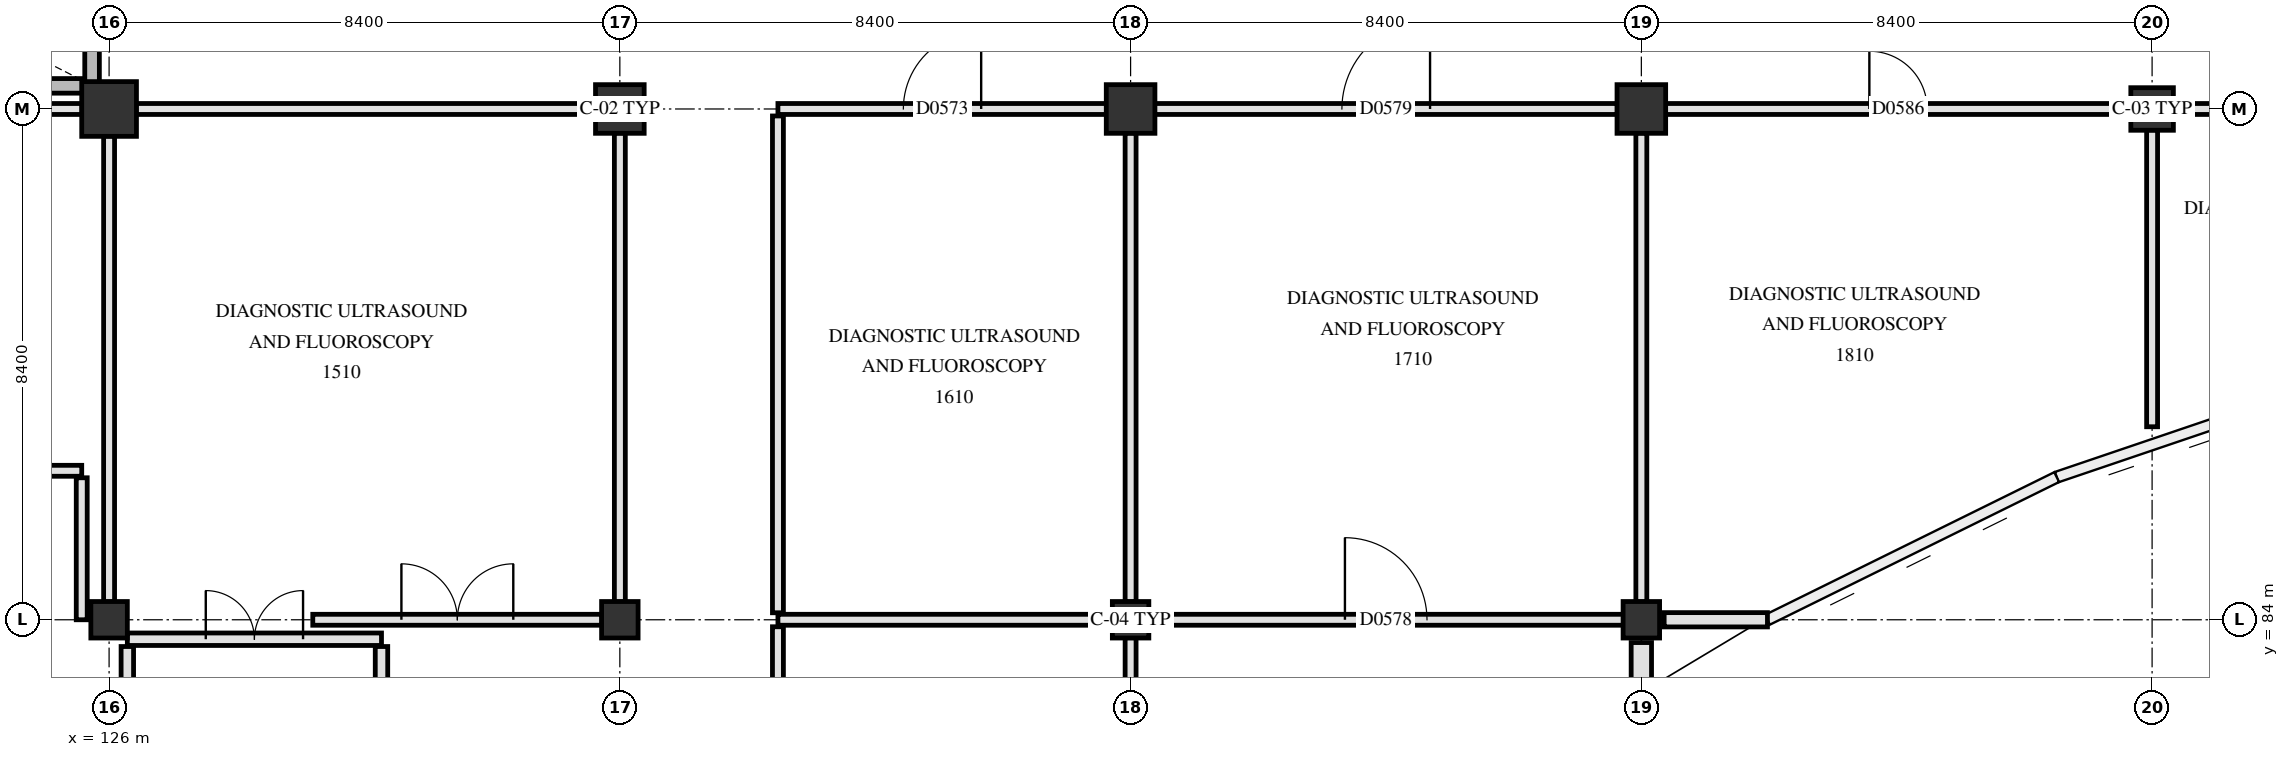
"""IFC4 building model, lengths in metres.
Left out: names, types, materials, properties, quantities, classifications, styles, units other than length and angle.
Written with IfcOpenShell. Run it as: python <this file> out.ifc"""

import sys

from ifc_helpers import new_model, si_unit, direction, frame, frame_2d, origin, origin_2d, place, context, subcontext, project, spatial, rectangle, extrude, element, fill, save


model = new_model("IFC4")
c1 = context("Model", 3, precision=1e-05, world=origin(), true_north=direction((0.0, 1.0)))
c2 = subcontext(c1, "Body", "Model", "MODEL_VIEW")
j1 = project(units=[si_unit("LENGTHUNIT", "METRE"), si_unit("PLANEANGLEUNIT", "RADIAN")], contexts=[c1])
p1 = place(None, origin())
s1 = spatial("IfcSite", under=j1, at=p1, CompositionType="ELEMENT")
p2 = place(p1, origin())
s2 = spatial("IfcBuilding", under=s1, at=p2, CompositionType="ELEMENT")
p3 = place(p2, origin())
s3 = spatial("IfcBuildingStorey", under=s2, at=p3, CompositionType="ELEMENT", Elevation=0.0)
p4 = place(p3, frame((126.0, 84.0, 0.0), z_axis=(0.0, 0.0, 1.0), x_axis=(1.0, 0.0, 0.0)))
e1 = element("IfcColumn", 1, at=p4, inside=s3, PredefinedType="COLUMN", context=c2, shape_type="SweptSolid", body=[
    extrude(rectangle(XDim=0.6, YDim=0.6, at=origin_2d()), origin(), (0.0, 0.0, 1.0), 4.8),
])
p5 = place(p3, frame((126.0, 92.4, 0.0), z_axis=(0.0, 0.0, 1.0), x_axis=(1.0, 0.0, 0.0)))
e2 = element("IfcColumn", 2, at=p5, inside=s3, PredefinedType="COLUMN", context=c2, shape_type="SweptSolid", body=[
    extrude(rectangle(XDim=0.9, YDim=0.9, at=origin_2d()), origin(), (0.0, 0.0, 1.0), 4.8),
])
p6 = place(p3, frame((134.4, 84.0, 0.0), z_axis=(0.0, 0.0, 1.0), x_axis=(1.0, 0.0, 0.0)))
e3 = element("IfcColumn", 3, at=p6, inside=s3, PredefinedType="COLUMN", context=c2, shape_type="SweptSolid", body=[
    extrude(rectangle(XDim=0.6, YDim=0.6, at=origin_2d()), origin(), (0.0, 0.0, 1.0), 4.8),
])
p7 = place(p3, frame((134.4, 92.4, 0.0), z_axis=(0.0, 0.0, 1.0), x_axis=(1.0, 0.0, 0.0)))
e4 = element("IfcColumn", 4, at=p7, inside=s3, PredefinedType="COLUMN", context=c2, shape_type="SweptSolid", body=[
    extrude(rectangle(XDim=0.8, YDim=0.8, at=origin_2d()), origin(), (0.0, 0.0, 1.0), 4.8),
])
p8 = place(p3, frame((142.8, 84.0, 0.0), z_axis=(0.0, 0.0, 1.0), x_axis=(1.0, 0.0, 0.0)))
e5 = element("IfcColumn", 5, at=p8, inside=s3, PredefinedType="COLUMN", context=c2, shape_type="SweptSolid", body=[
    extrude(rectangle(XDim=0.6, YDim=0.6, at=origin_2d()), origin(), (0.0, 0.0, 1.0), 4.8),
])
p9 = place(p3, frame((142.8, 92.4, 0.0), z_axis=(0.0, 0.0, 1.0), x_axis=(1.0, 0.0, 0.0)))
e6 = element("IfcColumn", 6, at=p9, inside=s3, PredefinedType="COLUMN", context=c2, shape_type="SweptSolid", body=[
    extrude(rectangle(XDim=0.8, YDim=0.8, at=origin_2d()), origin(), (0.0, 0.0, 1.0), 4.8),
])
p10 = place(p3, frame((151.2, 84.0, 0.0), z_axis=(0.0, 0.0, 1.0), x_axis=(1.0, 0.0, 0.0)))
e7 = element("IfcColumn", 7, at=p10, inside=s3, PredefinedType="COLUMN", context=c2, shape_type="SweptSolid", body=[
    extrude(rectangle(XDim=0.6, YDim=0.6, at=origin_2d()), origin(), (0.0, 0.0, 1.0), 4.8),
])
p11 = place(p3, frame((151.2, 92.4, 0.0), z_axis=(0.0, 0.0, 1.0), x_axis=(1.0, 0.0, 0.0)))
e8 = element("IfcColumn", 8, at=p11, inside=s3, PredefinedType="COLUMN", context=c2, shape_type="SweptSolid", body=[
    extrude(rectangle(XDim=0.8, YDim=0.8, at=origin_2d()), origin(), (0.0, 0.0, 1.0), 4.8),
])
p12 = place(p3, frame((159.6, 92.4, 0.0), z_axis=(0.0, 0.0, 1.0), x_axis=(1.0, 0.0, 0.0)))
e9 = element("IfcColumn", 9, at=p12, inside=s3, PredefinedType="COLUMN", context=c2, shape_type="SweptSolid", body=[
    extrude(rectangle(XDim=0.7, YDim=0.7, at=origin_2d()), origin(), (0.0, 0.0, 1.0), 4.8),
])
p13 = place(p3, frame((153.274, 84.0, 0.0), z_axis=(0.0, 0.0, 1.0), x_axis=(-1.0, 0.0, 0.0)))
e10 = element("IfcWall", 10, at=p13, inside=s3, PredefinedType="SOLIDWALL", context=c2, shape_type="SweptSolid", body=[
    extrude(rectangle(XDim=1.699, YDim=0.235, at=frame_2d((0.85, 0.0))), origin(), (0.0, 0.0, 1.0), 4.49),
])
p14 = place(p3, frame((151.2, 83.625, 0.0), z_axis=(0.0, 0.0, 1.0), x_axis=(0.0, -1.0, 0.0)))
e11 = element("IfcWall", 11, at=p14, inside=s3, PredefinedType="SOLIDWALL", context=c2, shape_type="SweptSolid", body=[
    extrude(rectangle(XDim=0.858, YDim=0.335, at=frame_2d((0.429, 0.0))), origin(), (0.0, 0.0, 1.0), 4.49),
])
p15 = place(p3, frame((117.9, 92.78, 0.0), z_axis=(0.0, 0.0, 1.0), x_axis=(1.0, 0.0, 0.0)))
e12 = element("IfcWall", 12, at=p15, inside=s3, PredefinedType="SHEAR", context=c2, shape_type="SweptSolid", body=[
    extrude(rectangle(XDim=7.82, YDim=0.24, at=frame_2d((3.91, 0.0))), origin(), (0.0, 0.0, 1.0), 4.5),
])
p16 = place(p3, frame((125.72, 92.78, 0.0), z_axis=(0.0, 0.0, 1.0), x_axis=(0.0, 1.0, 0.0)))
e13 = element("IfcWall", 13, at=p16, inside=s3, PredefinedType="SHEAR", context=c2, shape_type="SweptSolid", body=[
    extrude(rectangle(XDim=3.32, YDim=0.24, at=frame_2d((1.66, 0.0))), origin(), (0.0, 0.0, 1.0), 4.5),
])
p17 = place(p3, frame((130.48, 79.44, 0.0), z_axis=(0.0, 0.0, 1.0), x_axis=(0.0, 1.0, 0.0)))
e14 = element("IfcWall", 14, at=p17, inside=s3, PredefinedType="PARTITIONING", context=c2, shape_type="SweptSolid", body=[
    extrude(rectangle(XDim=4.12, YDim=0.205, at=frame_2d((2.06, 0.0))), origin(), (0.0, 0.0, 1.0), 4.49),
])
p18 = place(p3, frame((126.3, 79.44, 0.0), z_axis=(0.0, 0.0, 1.0), x_axis=(0.0, 1.0, 0.0)))
e15 = element("IfcWall", 15, at=p18, inside=s3, PredefinedType="PARTITIONING", context=c2, shape_type="SweptSolid", body=[
    extrude(rectangle(XDim=4.12, YDim=0.205, at=frame_2d((2.06, 0.0))), origin(), (0.0, 0.0, 1.0), 3.89),
])
p19 = place(p3, frame((126.3, 83.68, 0.0), z_axis=(0.0, 0.0, 1.0), x_axis=(1.0, 0.0, 0.0)))
e16 = element("IfcWall", 16, at=p19, inside=s3, PredefinedType="PARTITIONING", context=c2, shape_type="SweptSolid", body=[
    extrude(rectangle(XDim=4.18, YDim=0.205, at=frame_2d((2.09, 0.0))), origin(), (0.0, 0.0, 1.0), 3.84),
])
p20 = place(p19, frame((1.29, 0.0, 0.0)))
e17 = element("IfcOpeningElement", 17, at=p20, cuts=e16, PredefinedType="OPENING", context=c2, shape_type="SweptSolid", body=[
    extrude(rectangle(XDim=1.6, YDim=2.25, at=frame_2d((0.8, 1.125))), frame((0.0, 0.113, 0.0), z_axis=(0.0, -1.0, 0.0), x_axis=(1.0, 0.0, 0.0)), (0.0, 0.0, 1.0), 0.225),
])
p21 = place(p3, frame((129.35, 84.0, 0.0), z_axis=(0.0, 0.0, 1.0), x_axis=(1.0, 0.0, 0.0)))
e18 = element("IfcWall", 18, at=p21, inside=s3, PredefinedType="PARTITIONING", context=c2, shape_type="SweptSolid", body=[
    extrude(rectangle(XDim=4.755, YDim=0.18, at=frame_2d((2.377, 0.0))), origin(), (0.0, 0.0, 1.0), 3.84),
])
p22 = place(p21, frame((1.458, 0.0, 0.0)))
e19 = element("IfcOpeningElement", 19, at=p22, cuts=e18, PredefinedType="OPENING", context=c2, shape_type="SweptSolid", body=[
    extrude(rectangle(XDim=1.84, YDim=2.28, at=frame_2d((0.92, 1.14))), frame((0.0, 0.1, 0.0), z_axis=(0.0, -1.0, 0.0), x_axis=(1.0, 0.0, 0.0)), (0.0, 0.0, 1.0), 0.2),
])
p23 = place(p3, frame((137.0, 84.0, 0.0), z_axis=(0.0, 0.0, 1.0), x_axis=(1.0, 0.0, 0.0)))
e20 = element("IfcWall", 20, at=p23, inside=s3, PredefinedType="PARTITIONING", context=c2, shape_type="SweptSolid", body=[
    extrude(rectangle(XDim=5.505, YDim=0.18, at=frame_2d((2.752, 0.0))), origin(), (0.0, 0.0, 1.0), 3.84),
])
p24 = place(p3, frame((143.095, 84.0, 0.0), z_axis=(0.0, 0.0, 1.0), x_axis=(1.0, 0.0, 0.0)))
e21 = element("IfcWall", 21, at=p24, inside=s3, PredefinedType="PARTITIONING", context=c2, shape_type="SweptSolid", body=[
    extrude(rectangle(XDim=7.81, YDim=0.18, at=frame_2d((3.905, 0.0))), origin(), (0.0, 0.0, 1.0), 3.84),
])
p25 = place(p24, frame((3.23, 0.0, 0.0)))
e22 = element("IfcOpeningElement", 22, at=p25, cuts=e21, PredefinedType="OPENING", context=c2, shape_type="SweptSolid", body=[
    extrude(rectangle(XDim=1.35, YDim=2.2, at=frame_2d((0.675, 1.1))), frame((0.0, 0.1, 0.0), z_axis=(0.0, -1.0, 0.0), x_axis=(1.0, 0.0, 0.0)), (0.0, 0.0, 1.0), 0.2),
])
p26 = place(p3, frame((123.55, 86.45, 0.0), z_axis=(0.0, 0.0, 1.0), x_axis=(1.0, 0.0, 0.0)))
e23 = element("IfcWall", 23, at=p26, inside=s3, PredefinedType="PARTITIONING", context=c2, shape_type="SweptSolid", body=[
    extrude(rectangle(XDim=2.0, YDim=0.18, at=frame_2d((1.0, 0.0))), origin(), (0.0, 0.0, 1.0), 4.49),
])
p27 = place(p26, frame((0.525, 0.0, 0.0)))
e24 = element("IfcOpeningElement", 24, at=p27, cuts=e23, PredefinedType="OPENING", context=c2, shape_type="SweptSolid", body=[
    extrude(rectangle(XDim=0.95, YDim=2.1, at=frame_2d((0.475, 1.05))), frame((0.0, 0.1, 0.0), z_axis=(0.0, -1.0, 0.0), x_axis=(1.0, 0.0, 0.0)), (0.0, 0.0, 1.0), 0.2),
])
p28 = place(p3, frame((118.045, 92.4, 0.0), z_axis=(0.0, 0.0, 1.0), x_axis=(1.0, 0.0, 0.0)))
e25 = element("IfcWall", 25, at=p28, inside=s3, PredefinedType="PARTITIONING", context=c2, shape_type="SweptSolid", body=[
    extrude(rectangle(XDim=7.51, YDim=0.18, at=frame_2d((3.755, 0.0))), origin(), (0.0, 0.0, 1.0), 3.84),
])
p29 = place(p3, frame((126.445, 92.4, 0.0), z_axis=(0.0, 0.0, 1.0), x_axis=(1.0, 0.0, 0.0)))
e26 = element("IfcWall", 26, at=p29, inside=s3, PredefinedType="PARTITIONING", context=c2, shape_type="SweptSolid", body=[
    extrude(rectangle(XDim=7.56, YDim=0.18, at=frame_2d((3.78, 0.0))), origin(), (0.0, 0.0, 1.0), 3.84),
])
p30 = place(p3, frame((137.0, 92.4, 0.0), z_axis=(0.0, 0.0, 1.0), x_axis=(1.0, 0.0, 0.0)))
e27 = element("IfcWall", 27, at=p30, inside=s3, PredefinedType="PARTITIONING", context=c2, shape_type="SweptSolid", body=[
    extrude(rectangle(XDim=5.405, YDim=0.18, at=frame_2d((2.703, 0.0))), origin(), (0.0, 0.0, 1.0), 3.84),
])
p31 = place(p30, frame((2.062, 0.0, 0.0)))
e28 = element("IfcOpeningElement", 28, at=p31, cuts=e27, PredefinedType="OPENING", context=c2, shape_type="SweptSolid", body=[
    extrude(rectangle(XDim=1.28, YDim=2.18, at=frame_2d((0.64, 1.09))), frame((0.0, 0.1, 0.0), z_axis=(0.0, -1.0, 0.0), x_axis=(1.0, 0.0, 0.0)), (0.0, 0.0, 1.0), 0.2),
])
p32 = place(p3, frame((143.195, 92.4, 0.0), z_axis=(0.0, 0.0, 1.0), x_axis=(1.0, 0.0, 0.0)))
e29 = element("IfcWall", 29, at=p32, inside=s3, PredefinedType="PARTITIONING", context=c2, shape_type="SweptSolid", body=[
    extrude(rectangle(XDim=7.61, YDim=0.18, at=frame_2d((3.805, 0.0))), origin(), (0.0, 0.0, 1.0), 3.84),
])
p33 = place(p32, frame((3.08, 0.0, 0.0)))
e30 = element("IfcOpeningElement", 30, at=p33, cuts=e29, PredefinedType="OPENING", context=c2, shape_type="SweptSolid", body=[
    extrude(rectangle(XDim=1.45, YDim=2.2, at=frame_2d((0.725, 1.1))), frame((0.0, 0.1, 0.0), z_axis=(0.0, -1.0, 0.0), x_axis=(1.0, 0.0, 0.0)), (0.0, 0.0, 1.0), 0.2),
])
p34 = place(p3, frame((151.595, 92.4, 0.0), z_axis=(0.0, 0.0, 1.0), x_axis=(1.0, 0.0, 0.0)))
e31 = element("IfcWall", 31, at=p34, inside=s3, PredefinedType="PARTITIONING", context=c2, shape_type="SweptSolid", body=[
    extrude(rectangle(XDim=7.66, YDim=0.18, at=frame_2d((3.83, 0.0))), origin(), (0.0, 0.0, 1.0), 3.84),
])
p35 = place(p34, frame((3.355, 0.0, 0.0)))
e32 = element("IfcOpeningElement", 32, at=p35, cuts=e31, PredefinedType="OPENING", context=c2, shape_type="SweptSolid", body=[
    extrude(rectangle(XDim=0.95, YDim=2.1, at=frame_2d((0.475, 1.05))), frame((0.0, 0.1, 0.0), z_axis=(0.0, -1.0, 0.0), x_axis=(1.0, 0.0, 0.0)), (0.0, 0.0, 1.0), 0.2),
])
p36 = place(p3, frame((159.945, 92.4, 0.0), z_axis=(0.0, 0.0, 1.0), x_axis=(1.0, 0.0, 0.0)))
e33 = element("IfcWall", 33, at=p36, inside=s3, PredefinedType="PARTITIONING", context=c2, shape_type="SweptSolid", body=[
    extrude(rectangle(XDim=7.71, YDim=0.18, at=frame_2d((3.855, 0.0))), origin(), (0.0, 0.0, 1.0), 3.84),
])
p37 = place(p36, frame((3.085, 0.0, 0.0)))
e34 = element("IfcOpeningElement", 34, at=p37, cuts=e33, PredefinedType="OPENING", context=c2, shape_type="SweptSolid", body=[
    extrude(rectangle(XDim=1.54, YDim=2.24, at=frame_2d((0.77, 1.12))), frame((0.0, 0.1, 0.0), z_axis=(0.0, -1.0, 0.0), x_axis=(1.0, 0.0, 0.0)), (0.0, 0.0, 1.0), 0.2),
])
p38 = place(p3, frame((125.55, 84.0, 0.0), z_axis=(0.0, 0.0, 1.0), x_axis=(0.0, 1.0, 0.0)))
e35 = element("IfcWall", 35, at=p38, inside=s3, PredefinedType="PARTITIONING", context=c2, shape_type="SweptSolid", body=[
    extrude(rectangle(XDim=2.335, YDim=0.18, at=frame_2d((1.167, 0.0))), origin(), (0.0, 0.0, 1.0), 3.84),
])
p39 = place(p3, frame((126.0, 84.295, 0.0), z_axis=(0.0, 0.0, 1.0), x_axis=(0.0, 1.0, 0.0)))
e36 = element("IfcWall", 36, at=p39, inside=s3, PredefinedType="PARTITIONING", context=c2, shape_type="SweptSolid", body=[
    extrude(rectangle(XDim=7.66, YDim=0.18, at=frame_2d((3.83, 0.0))), origin(), (0.0, 0.0, 1.0), 3.89),
])
p40 = place(p3, frame((134.4, 84.295, 0.0), z_axis=(0.0, 0.0, 1.0), x_axis=(0.0, 1.0, 0.0)))
e37 = element("IfcWall", 37, at=p40, inside=s3, PredefinedType="PARTITIONING", context=c2, shape_type="SweptSolid", body=[
    extrude(rectangle(XDim=7.71, YDim=0.18, at=frame_2d((3.855, 0.0))), origin(), (0.0, 0.0, 1.0), 3.89),
])
p41 = place(p3, frame((137.0, 78.315, 0.0), z_axis=(0.0, 0.0, 1.0), x_axis=(0.0, 1.0, 0.0)))
e38 = element("IfcWall", 38, at=p41, inside=s3, PredefinedType="PARTITIONING", context=c2, shape_type="SweptSolid", body=[
    extrude(rectangle(XDim=5.57, YDim=0.18, at=frame_2d((2.785, 0.0))), origin(), (0.0, 0.0, 1.0), 3.84),
])
p42 = place(p3, frame((137.0, 84.115, 0.0), z_axis=(0.0, 0.0, 1.0), x_axis=(0.0, 1.0, 0.0)))
e39 = element("IfcWall", 39, at=p42, inside=s3, PredefinedType="PARTITIONING", context=c2, shape_type="SweptSolid", body=[
    extrude(rectangle(XDim=8.17, YDim=0.18, at=frame_2d((4.085, 0.0))), origin(), (0.0, 0.0, 1.0), 3.84),
])
p43 = place(p3, frame((142.8, 78.315, 0.0), z_axis=(0.0, 0.0, 1.0), x_axis=(0.0, 1.0, 0.0)))
e40 = element("IfcWall", 40, at=p43, inside=s3, PredefinedType="PARTITIONING", context=c2, shape_type="SweptSolid", body=[
    extrude(rectangle(XDim=5.39, YDim=0.18, at=frame_2d((2.695, 0.0))), origin(), (0.0, 0.0, 1.0), 4.49),
])
for number, where, z_axis, x_axis in (
    (41, (142.8, 84.295, 0.0), (0.0, 0.0, 1.0), (0.0, 1.0, 0.0)),
    (42, (151.2, 84.295, 0.0), (0.0, 0.0, 1.0), (0.0, 1.0, 0.0)),
):
    element("IfcWall", number, at=place(p3, frame(where, z_axis=z_axis, x_axis=x_axis)), inside=s3, PredefinedType="PARTITIONING", context=c2, shape_type="SweptSolid", body=[
        extrude(rectangle(XDim=7.71, YDim=0.18, at=frame_2d((3.855, 0.0))), origin(), (0.0, 0.0, 1.0), 3.89),
    ])
p44 = place(p3, frame((159.6, 87.174, 0.0), z_axis=(0.0, 0.0, 1.0), x_axis=(0.0, 1.0, 0.0)))
e43 = element("IfcWall", 43, at=p44, inside=s3, PredefinedType="PARTITIONING", context=c2, shape_type="SweptSolid", body=[
    extrude(rectangle(XDim=4.881, YDim=0.18, at=frame_2d((2.44, 0.0))), origin(), (0.0, 0.0, 1.0), 4.49),
])
p45 = place(p20, origin())
e44 = element("IfcDoor", 44, at=p45, inside=s3, OperationType="DOUBLE_SWING_LEFT", PredefinedType="DOOR", context=c2, shape_type="SweptSolid", body=[
    extrude(rectangle(XDim=1.6, YDim=2.25, at=frame_2d((0.8, 1.125))), frame((0.0, 0.025, 0.0), z_axis=(0.0, -1.0, 0.0), x_axis=(1.0, 0.0, 0.0)), (0.0, 0.0, 1.0), 0.05),
])
fill(e17, e44)
p46 = place(p22, origin())
e45 = element("IfcDoor", 45, at=p46, inside=s3, OperationType="DOUBLE_SWING_LEFT", PredefinedType="DOOR", context=c2, shape_type="SweptSolid", body=[
    extrude(rectangle(XDim=1.84, YDim=2.28, at=frame_2d((0.92, 1.14))), frame((0.0, 0.025, 0.0), z_axis=(0.0, -1.0, 0.0), x_axis=(1.0, 0.0, 0.0)), (0.0, 0.0, 1.0), 0.05),
])
fill(e19, e45)
p47 = place(p31, origin())
e46 = element("IfcDoor", 46, at=p47, inside=s3, OperationType="SINGLE_SWING_RIGHT", PredefinedType="DOOR", context=c2, shape_type="SweptSolid", body=[
    extrude(rectangle(XDim=1.28, YDim=2.18, at=frame_2d((0.64, 1.09))), frame((0.0, 0.025, 0.0), z_axis=(0.0, -1.0, 0.0), x_axis=(1.0, 0.0, 0.0)), (0.0, 0.0, 1.0), 0.05),
])
fill(e28, e46)
p48 = place(p25, origin())
e47 = element("IfcDoor", 47, at=p48, inside=s3, OperationType="SINGLE_SWING_LEFT", PredefinedType="DOOR", context=c2, shape_type="SweptSolid", body=[
    extrude(rectangle(XDim=1.35, YDim=2.2, at=frame_2d((0.675, 1.1))), frame((0.0, 0.025, 0.0), z_axis=(0.0, -1.0, 0.0), x_axis=(1.0, 0.0, 0.0)), (0.0, 0.0, 1.0), 0.05),
])
fill(e22, e47)
p49 = place(p33, origin())
e48 = element("IfcDoor", 48, at=p49, inside=s3, OperationType="SINGLE_SWING_RIGHT", PredefinedType="DOOR", context=c2, shape_type="SweptSolid", body=[
    extrude(rectangle(XDim=1.45, YDim=2.2, at=frame_2d((0.725, 1.1))), frame((0.0, 0.025, 0.0), z_axis=(0.0, -1.0, 0.0), x_axis=(1.0, 0.0, 0.0)), (0.0, 0.0, 1.0), 0.05),
])
fill(e30, e48)
p50 = place(p35, origin())
e49 = element("IfcDoor", 49, at=p50, inside=s3, OperationType="SINGLE_SWING_LEFT", PredefinedType="DOOR", context=c2, shape_type="SweptSolid", body=[
    extrude(rectangle(XDim=0.95, YDim=2.1, at=frame_2d((0.475, 1.05))), frame((0.0, 0.025, 0.0), z_axis=(0.0, -1.0, 0.0), x_axis=(1.0, 0.0, 0.0)), (0.0, 0.0, 1.0), 0.05),
])
fill(e32, e49)
save(model, sys.argv[1])
